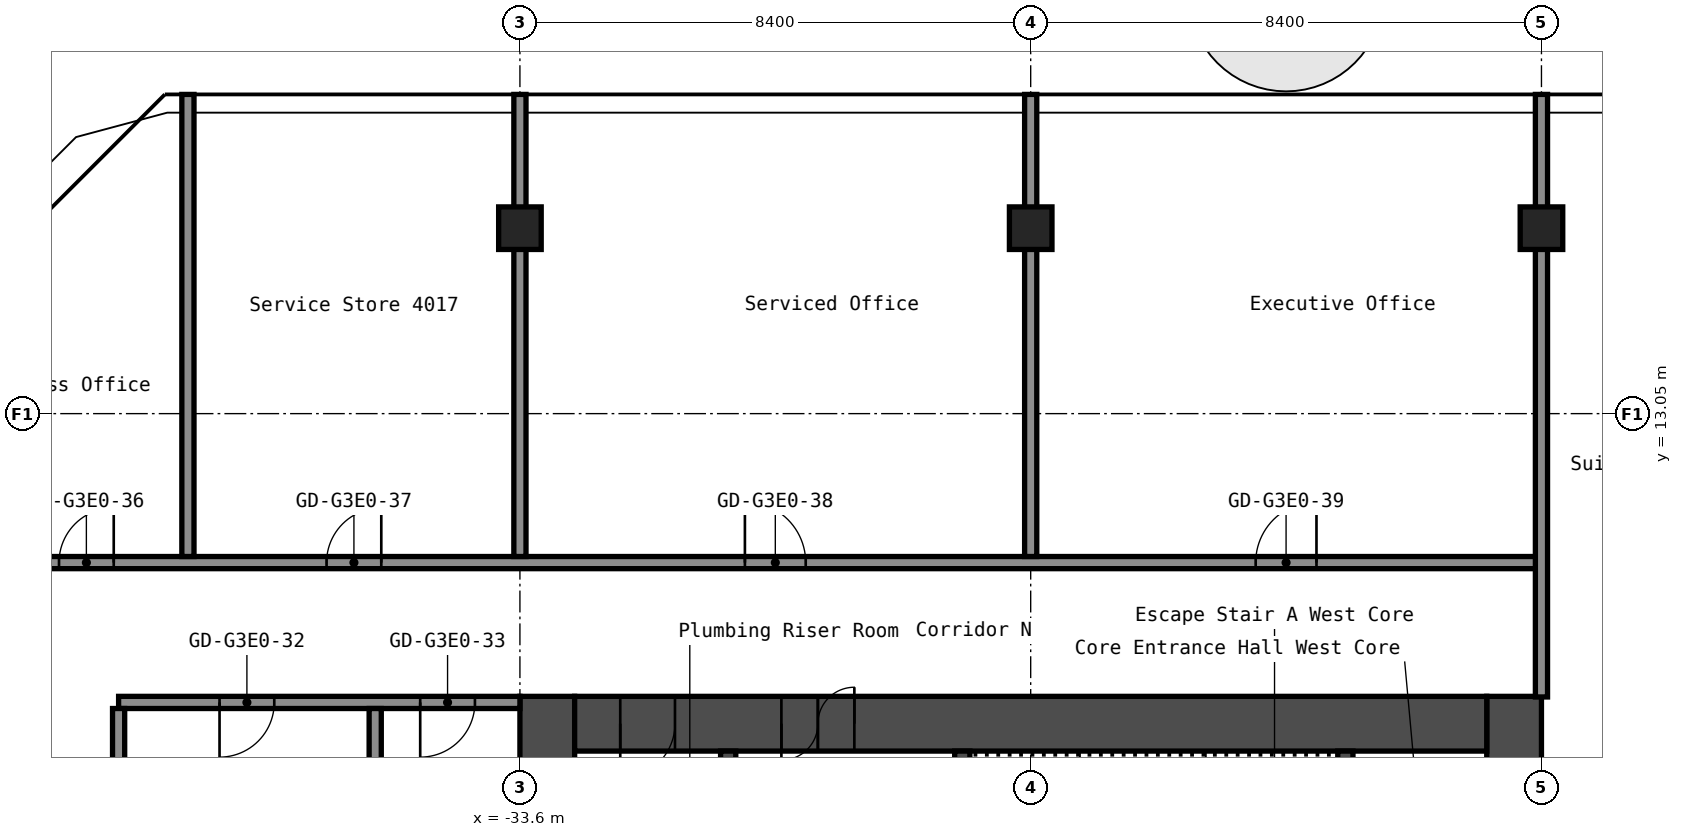
"""IFC4 building model, lengths in metres.
Left out: names, types, materials, properties, quantities, classifications, styles, units other than length and angle.
Written with IfcOpenShell. Run it as: python <this file> out.ifc"""

import sys

from ifc_helpers import new_model, si_unit, direction, frame, frame_2d, origin, origin_2d, place, context, subcontext, project, spatial, rectangle, hollow_rectangle, extrude, element, fill, save


model = new_model("IFC4")
c1 = context("Model", 3, precision=1e-05, world=origin(), true_north=direction((0.0, 1.0)))
c2 = subcontext(c1, "Body", "Model", "MODEL_VIEW")
j1 = project(units=[si_unit("LENGTHUNIT", "METRE"), si_unit("PLANEANGLEUNIT", "RADIAN")], contexts=[c1])
p1 = place(None, origin())
s1 = spatial("IfcSite", under=j1, at=p1, CompositionType="ELEMENT")
p2 = place(p1, origin())
s2 = spatial("IfcBuilding", under=s1, at=p2, CompositionType="ELEMENT")
p3 = place(p2, frame((0.0, 0.0, 143.8)))
s3 = spatial("IfcBuildingStorey", under=s2, at=p3, CompositionType="ELEMENT", Elevation=143.8)
for number, where, z_axis, x_axis in (
    (1, (-33.6, 16.1, 0.0), (0.0, 0.0, 1.0), (1.0, 0.0, 0.0)),
    (2, (-25.2, 16.1, 0.0), (0.0, 0.0, 1.0), (1.0, 0.0, 0.0)),
    (3, (-16.8, 16.1, 0.0), (0.0, 0.0, 1.0), (1.0, 0.0, 0.0)),
):
    element("IfcColumn", number, at=place(p3, frame(where, z_axis=z_axis, x_axis=x_axis)), inside=s3, PredefinedType="COLUMN", context=c2, shape_type="SweptSolid", body=[
        extrude(hollow_rectangle(XDim=0.7, YDim=0.7, WallThickness=0.028, at=origin_2d()), origin(), (0.0, 0.0, 1.0), 2.75),
    ])
p4 = place(p3, frame((-17.25, -8.4, 0.0), z_axis=(0.0, 0.0, 1.0), x_axis=(0.0, 1.0, 0.0)))
e4 = element("IfcWall", 4, at=p4, inside=s3, PredefinedType="SHEAR", context=c2, shape_type="SweptSolid", body=[
    extrude(rectangle(XDim=16.8, YDim=0.9, at=frame_2d((8.4, 0.0))), origin(), (0.0, 0.0, 1.0), 2.75),
])
p5 = place(p4, frame((7.1, 0.0, 0.0)))
e5 = element("IfcOpeningElement", 5, at=p5, cuts=e4, PredefinedType="OPENING", context=c2, shape_type="SweptSolid", body=[
    extrude(rectangle(XDim=1.6, YDim=2.1, at=frame_2d((0.8, 1.05))), frame((0.0, 0.46, 0.0), z_axis=(0.0, -1.0, 0.0), x_axis=(1.0, 0.0, 0.0)), (0.0, 0.0, 1.0), 0.92),
])
p6 = place(p3, frame((-33.15, -8.4, 0.0), z_axis=(0.0, 0.0, 1.0), x_axis=(0.0, 1.0, 0.0)))
e6 = element("IfcWall", 6, at=p6, inside=s3, PredefinedType="SHEAR", context=c2, shape_type="SweptSolid", body=[
    extrude(rectangle(XDim=16.8, YDim=0.9, at=frame_2d((8.4, 0.0))), origin(), (0.0, 0.0, 1.0), 2.75),
])
p7 = place(p3, frame((-32.7, 7.95, 0.0), z_axis=(0.0, 0.0, 1.0), x_axis=(1.0, 0.0, 0.0)))
e7 = element("IfcWall", 7, at=p7, inside=s3, PredefinedType="SHEAR", context=c2, shape_type="SweptSolid", body=[
    extrude(rectangle(XDim=15.0, YDim=0.9, at=frame_2d((7.5, 0.0))), origin(), (0.0, 0.0, 1.0), 2.75),
])
p8 = place(p7, frame((3.4, 0.0, 0.0)))
e8 = element("IfcOpeningElement", 8, at=p8, cuts=e7, PredefinedType="OPENING", context=c2, shape_type="SweptSolid", body=[
    extrude(rectangle(XDim=1.2, YDim=2.1, at=frame_2d((0.6, 1.05))), frame((0.0, 0.46, 0.0), z_axis=(0.0, -1.0, 0.0), x_axis=(1.0, 0.0, 0.0)), (0.0, 0.0, 1.0), 0.92),
])
p9 = place(p7, frame((0.75, 0.0, 0.0)))
e9 = element("IfcOpeningElement", 9, at=p9, cuts=e7, PredefinedType="OPENING", context=c2, shape_type="SweptSolid", body=[
    extrude(rectangle(XDim=0.9, YDim=2.1, at=frame_2d((0.45, 1.05))), frame((0.0, 0.46, 0.0), z_axis=(0.0, -1.0, 0.0), x_axis=(1.0, 0.0, 0.0)), (0.0, 0.0, 1.0), 0.92),
])
p10 = place(p3, frame((-20.025, 1.2, 0.0), z_axis=(0.0, 0.0, 1.0), x_axis=(0.0, 1.0, 0.0)))
e10 = element("IfcWall", 10, at=p10, inside=s3, PredefinedType="SHEAR", context=c2, shape_type="SweptSolid", body=[
    extrude(rectangle(XDim=6.3, YDim=0.25, at=frame_2d((3.15, 0.0))), origin(), (0.0, 0.0, 1.0), 2.75),
])
p11 = place(p3, frame((-26.325, 3.75, 0.0), z_axis=(0.0, 0.0, 1.0), x_axis=(0.0, 1.0, 0.0)))
e11 = element("IfcWall", 11, at=p11, inside=s3, PredefinedType="SHEAR", context=c2, shape_type="SweptSolid", body=[
    extrude(rectangle(XDim=3.75, YDim=0.25, at=frame_2d((1.875, 0.0))), origin(), (0.0, 0.0, 1.0), 2.75),
])
p12 = place(p11, frame((1.25, 0.0, 0.0)))
e12 = element("IfcOpeningElement", 12, at=p12, cuts=e11, PredefinedType="OPENING", context=c2, shape_type="SweptSolid", body=[
    extrude(rectangle(XDim=1.2, YDim=2.1, at=frame_2d((0.6, 1.05))), frame((0.0, 0.135, 0.0), z_axis=(0.0, -1.0, 0.0), x_axis=(1.0, 0.0, 0.0)), (0.0, 0.0, 1.0), 0.27),
])
p13 = place(p3, frame((-30.175, 1.45, 0.0), z_axis=(0.0, 0.0, 1.0), x_axis=(0.0, 1.0, 0.0)))
e13 = element("IfcWall", 13, at=p13, inside=s3, PredefinedType="SHEAR", context=c2, shape_type="SweptSolid", body=[
    extrude(rectangle(XDim=6.05, YDim=0.25, at=frame_2d((3.025, 0.0))), origin(), (0.0, 0.0, 1.0), 2.75),
])
p14 = place(p13, frame((2.625, 0.0, 0.0)))
e14 = element("IfcOpeningElement", 14, at=p14, cuts=e13, PredefinedType="OPENING", context=c2, shape_type="SweptSolid", body=[
    extrude(rectangle(XDim=1.1, YDim=2.1, at=frame_2d((0.55, 1.05))), frame((0.0, 0.135, 0.0), z_axis=(0.0, -1.0, 0.0), x_axis=(1.0, 0.0, 0.0)), (0.0, 0.0, 1.0), 0.27),
])
p15 = place(p3, frame((-40.2, 8.3, 0.0), z_axis=(0.0, 0.0, 1.0), x_axis=(1.0, 0.0, 0.0)))
e15 = element("IfcWall", 15, at=p15, inside=s3, PredefinedType="PARTITIONING", context=c2, shape_type="SweptSolid", body=[
    extrude(rectangle(XDim=6.6, YDim=0.2, at=frame_2d((3.3, 0.0))), origin(), (0.0, 0.0, 1.0), 2.75),
])
p16 = place(p15, frame((1.66, 0.0, 0.0)))
e16 = element("IfcOpeningElement", 16, at=p16, cuts=e15, PredefinedType="OPENING", context=c2, shape_type="SweptSolid", body=[
    extrude(rectangle(XDim=0.9, YDim=2.1, at=frame_2d((0.45, 1.05))), frame((0.0, 0.11, 0.0), z_axis=(0.0, -1.0, 0.0), x_axis=(1.0, 0.0, 0.0)), (0.0, 0.0, 1.0), 0.22),
])
p17 = place(p15, frame((4.96, 0.0, 0.0)))
e17 = element("IfcOpeningElement", 17, at=p17, cuts=e15, PredefinedType="OPENING", context=c2, shape_type="SweptSolid", body=[
    extrude(rectangle(XDim=0.9, YDim=2.1, at=frame_2d((0.45, 1.05))), frame((0.0, 0.11, 0.0), z_axis=(0.0, -1.0, 0.0), x_axis=(1.0, 0.0, 0.0)), (0.0, 0.0, 1.0), 0.22),
])
p18 = place(p3, frame((-42.7, 10.6, 0.0), z_axis=(0.0, 0.0, 1.0), x_axis=(1.0, 0.0, 0.0)))
e18 = element("IfcWall", 18, at=p18, inside=s3, PredefinedType="PARTITIONING", context=c2, shape_type="SweptSolid", body=[
    extrude(rectangle(XDim=25.9, YDim=0.2, at=frame_2d((12.95, 0.0))), origin(), (0.0, 0.0, 1.0), 2.75),
])
p19 = place(p18, frame((1.52, 0.0, 0.0)))
e19 = element("IfcOpeningElement", 19, at=p19, cuts=e18, PredefinedType="OPENING", context=c2, shape_type="SweptSolid", body=[
    extrude(rectangle(XDim=0.9, YDim=2.1, at=frame_2d((0.45, 1.05))), frame((0.0, 0.11, 0.0), z_axis=(0.0, -1.0, 0.0), x_axis=(1.0, 0.0, 0.0)), (0.0, 0.0, 1.0), 0.22),
])
p20 = place(p18, frame((5.92, 0.0, 0.0)))
e20 = element("IfcOpeningElement", 20, at=p20, cuts=e18, PredefinedType="OPENING", context=c2, shape_type="SweptSolid", body=[
    extrude(rectangle(XDim=0.9, YDim=2.1, at=frame_2d((0.45, 1.05))), frame((0.0, 0.11, 0.0), z_axis=(0.0, -1.0, 0.0), x_axis=(1.0, 0.0, 0.0)), (0.0, 0.0, 1.0), 0.22),
])
p21 = place(p18, frame((12.8, 0.0, 0.0)))
e21 = element("IfcOpeningElement", 21, at=p21, cuts=e18, PredefinedType="OPENING", context=c2, shape_type="SweptSolid", body=[
    extrude(rectangle(XDim=1.0, YDim=2.1, at=frame_2d((0.5, 1.05))), frame((0.0, 0.11, 0.0), z_axis=(0.0, -1.0, 0.0), x_axis=(1.0, 0.0, 0.0)), (0.0, 0.0, 1.0), 0.22),
])
p22 = place(p18, frame((21.2, 0.0, 0.0)))
e22 = element("IfcOpeningElement", 22, at=p22, cuts=e18, PredefinedType="OPENING", context=c2, shape_type="SweptSolid", body=[
    extrude(rectangle(XDim=1.0, YDim=2.1, at=frame_2d((0.5, 1.05))), frame((0.0, 0.11, 0.0), z_axis=(0.0, -1.0, 0.0), x_axis=(1.0, 0.0, 0.0)), (0.0, 0.0, 1.0), 0.22),
])
p23 = place(p3, frame((-40.2, -8.2, 0.0), z_axis=(0.0, 0.0, 1.0), x_axis=(0.0, 1.0, 0.0)))
e23 = element("IfcWall", 23, at=p23, inside=s3, PredefinedType="PARTITIONING", context=c2, shape_type="SweptSolid", body=[
    extrude(rectangle(XDim=16.4, YDim=0.2, at=frame_2d((8.2, 0.0))), origin(), (0.0, 0.0, 1.0), 2.75),
])
p24 = place(p3, frame((-39.06, 10.7, 0.0), z_axis=(0.0, 0.0, 1.0), x_axis=(0.0, 1.0, 0.0)))
e24 = element("IfcWall", 24, at=p24, inside=s3, PredefinedType="PARTITIONING", context=c2, shape_type="SweptSolid", body=[
    extrude(rectangle(XDim=7.6, YDim=0.2, at=frame_2d((3.8, 0.0))), origin(), (0.0, 0.0, 1.0), 2.75),
])
p25 = place(p3, frame((-35.98, 0.0, 0.0), z_axis=(0.0, 0.0, 1.0), x_axis=(0.0, 1.0, 0.0)))
e25 = element("IfcWall", 25, at=p25, inside=s3, PredefinedType="PARTITIONING", context=c2, shape_type="SweptSolid", body=[
    extrude(rectangle(XDim=8.2, YDim=0.2, at=frame_2d((4.1, 0.0))), origin(), (0.0, 0.0, 1.0), 2.75),
])
for number, where, z_axis, x_axis in (
    (26, (-33.6, 10.7, 0.0), (0.0, 0.0, 1.0), (0.0, 1.0, 0.0)),
    (27, (-25.2, 10.7, 0.0), (0.0, 0.0, 1.0), (0.0, 1.0, 0.0)),
):
    element("IfcWall", number, at=place(p3, frame(where, z_axis=z_axis, x_axis=x_axis)), inside=s3, PredefinedType="PARTITIONING", context=c2, shape_type="SweptSolid", body=[
        extrude(rectangle(XDim=7.6, YDim=0.2, at=frame_2d((3.8, 0.0))), origin(), (0.0, 0.0, 1.0), 2.75),
    ])
p26 = place(p3, frame((-16.8, 8.39, 0.0), z_axis=(0.0, 0.0, 1.0), x_axis=(0.0, 1.0, 0.0)))
e28 = element("IfcWall", 28, at=p26, inside=s3, PredefinedType="PARTITIONING", context=c2, shape_type="SweptSolid", body=[
    extrude(rectangle(XDim=9.91, YDim=0.2, at=frame_2d((4.955, 0.0))), origin(), (0.0, 0.0, 1.0), 2.75),
])
p27 = place(p8, origin())
e29 = element("IfcDoor", 29, at=p27, inside=s3, OperationType="DOUBLE_DOOR_SINGLE_SWING", PredefinedType="DOOR", context=c2, shape_type="SweptSolid", body=[
    extrude(rectangle(XDim=1.2, YDim=2.1, at=frame_2d((0.6, 1.05))), frame((0.0, 0.025, 0.0), z_axis=(0.0, -1.0, 0.0), x_axis=(1.0, 0.0, 0.0)), (0.0, 0.0, 1.0), 0.05),
])
fill(e8, e29)
p28 = place(p9, origin())
e30 = element("IfcDoor", 30, at=p28, inside=s3, OperationType="SINGLE_SWING_LEFT", PredefinedType="DOOR", context=c2, shape_type="SweptSolid", body=[
    extrude(rectangle(XDim=0.9, YDim=2.1, at=frame_2d((0.45, 1.05))), frame((0.0, 0.025, 0.0), z_axis=(0.0, -1.0, 0.0), x_axis=(1.0, 0.0, 0.0)), (0.0, 0.0, 1.0), 0.05),
])
fill(e9, e30)
p29 = place(p16, origin())
e31 = element("IfcDoor", 31, at=p29, inside=s3, OperationType="SINGLE_SWING_LEFT", PredefinedType="DOOR", context=c2, shape_type="SweptSolid", body=[
    extrude(rectangle(XDim=0.9, YDim=2.1, at=frame_2d((0.45, 1.05))), frame((0.0, 0.025, 0.0), z_axis=(0.0, -1.0, 0.0), x_axis=(1.0, 0.0, 0.0)), (0.0, 0.0, 1.0), 0.05),
])
fill(e16, e31)
p30 = place(p17, origin())
e32 = element("IfcDoor", 32, at=p30, inside=s3, OperationType="SINGLE_SWING_LEFT", PredefinedType="DOOR", context=c2, shape_type="SweptSolid", body=[
    extrude(rectangle(XDim=0.9, YDim=2.1, at=frame_2d((0.45, 1.05))), frame((0.0, 0.025, 0.0), z_axis=(0.0, -1.0, 0.0), x_axis=(1.0, 0.0, 0.0)), (0.0, 0.0, 1.0), 0.05),
])
fill(e17, e32)
p31 = place(p19, origin())
e33 = element("IfcDoor", 33, at=p31, inside=s3, OperationType="SINGLE_SWING_LEFT", PredefinedType="DOOR", context=c2, shape_type="SweptSolid", body=[
    extrude(rectangle(XDim=0.9, YDim=2.1, at=frame_2d((0.45, 1.05))), frame((0.0, 0.025, 0.0), z_axis=(0.0, -1.0, 0.0), x_axis=(1.0, 0.0, 0.0)), (0.0, 0.0, 1.0), 0.05),
])
fill(e19, e33)
p32 = place(p20, origin())
e34 = element("IfcDoor", 34, at=p32, inside=s3, OperationType="SINGLE_SWING_LEFT", PredefinedType="DOOR", context=c2, shape_type="SweptSolid", body=[
    extrude(rectangle(XDim=0.9, YDim=2.1, at=frame_2d((0.45, 1.05))), frame((0.0, 0.025, 0.0), z_axis=(0.0, -1.0, 0.0), x_axis=(1.0, 0.0, 0.0)), (0.0, 0.0, 1.0), 0.05),
])
fill(e20, e34)
p33 = place(p21, origin())
e35 = element("IfcDoor", 35, at=p33, inside=s3, OperationType="SINGLE_SWING_RIGHT", PredefinedType="DOOR", context=c2, shape_type="SweptSolid", body=[
    extrude(rectangle(XDim=1.0, YDim=2.1, at=frame_2d((0.5, 1.05))), frame((0.0, 0.025, 0.0), z_axis=(0.0, -1.0, 0.0), x_axis=(1.0, 0.0, 0.0)), (0.0, 0.0, 1.0), 0.05),
])
fill(e21, e35)
p34 = place(p22, origin())
e36 = element("IfcDoor", 36, at=p34, inside=s3, OperationType="SINGLE_SWING_LEFT", PredefinedType="DOOR", context=c2, shape_type="SweptSolid", body=[
    extrude(rectangle(XDim=1.0, YDim=2.1, at=frame_2d((0.5, 1.05))), frame((0.0, 0.025, 0.0), z_axis=(0.0, -1.0, 0.0), x_axis=(1.0, 0.0, 0.0)), (0.0, 0.0, 1.0), 0.05),
])
fill(e22, e36)
save(model, sys.argv[1])
